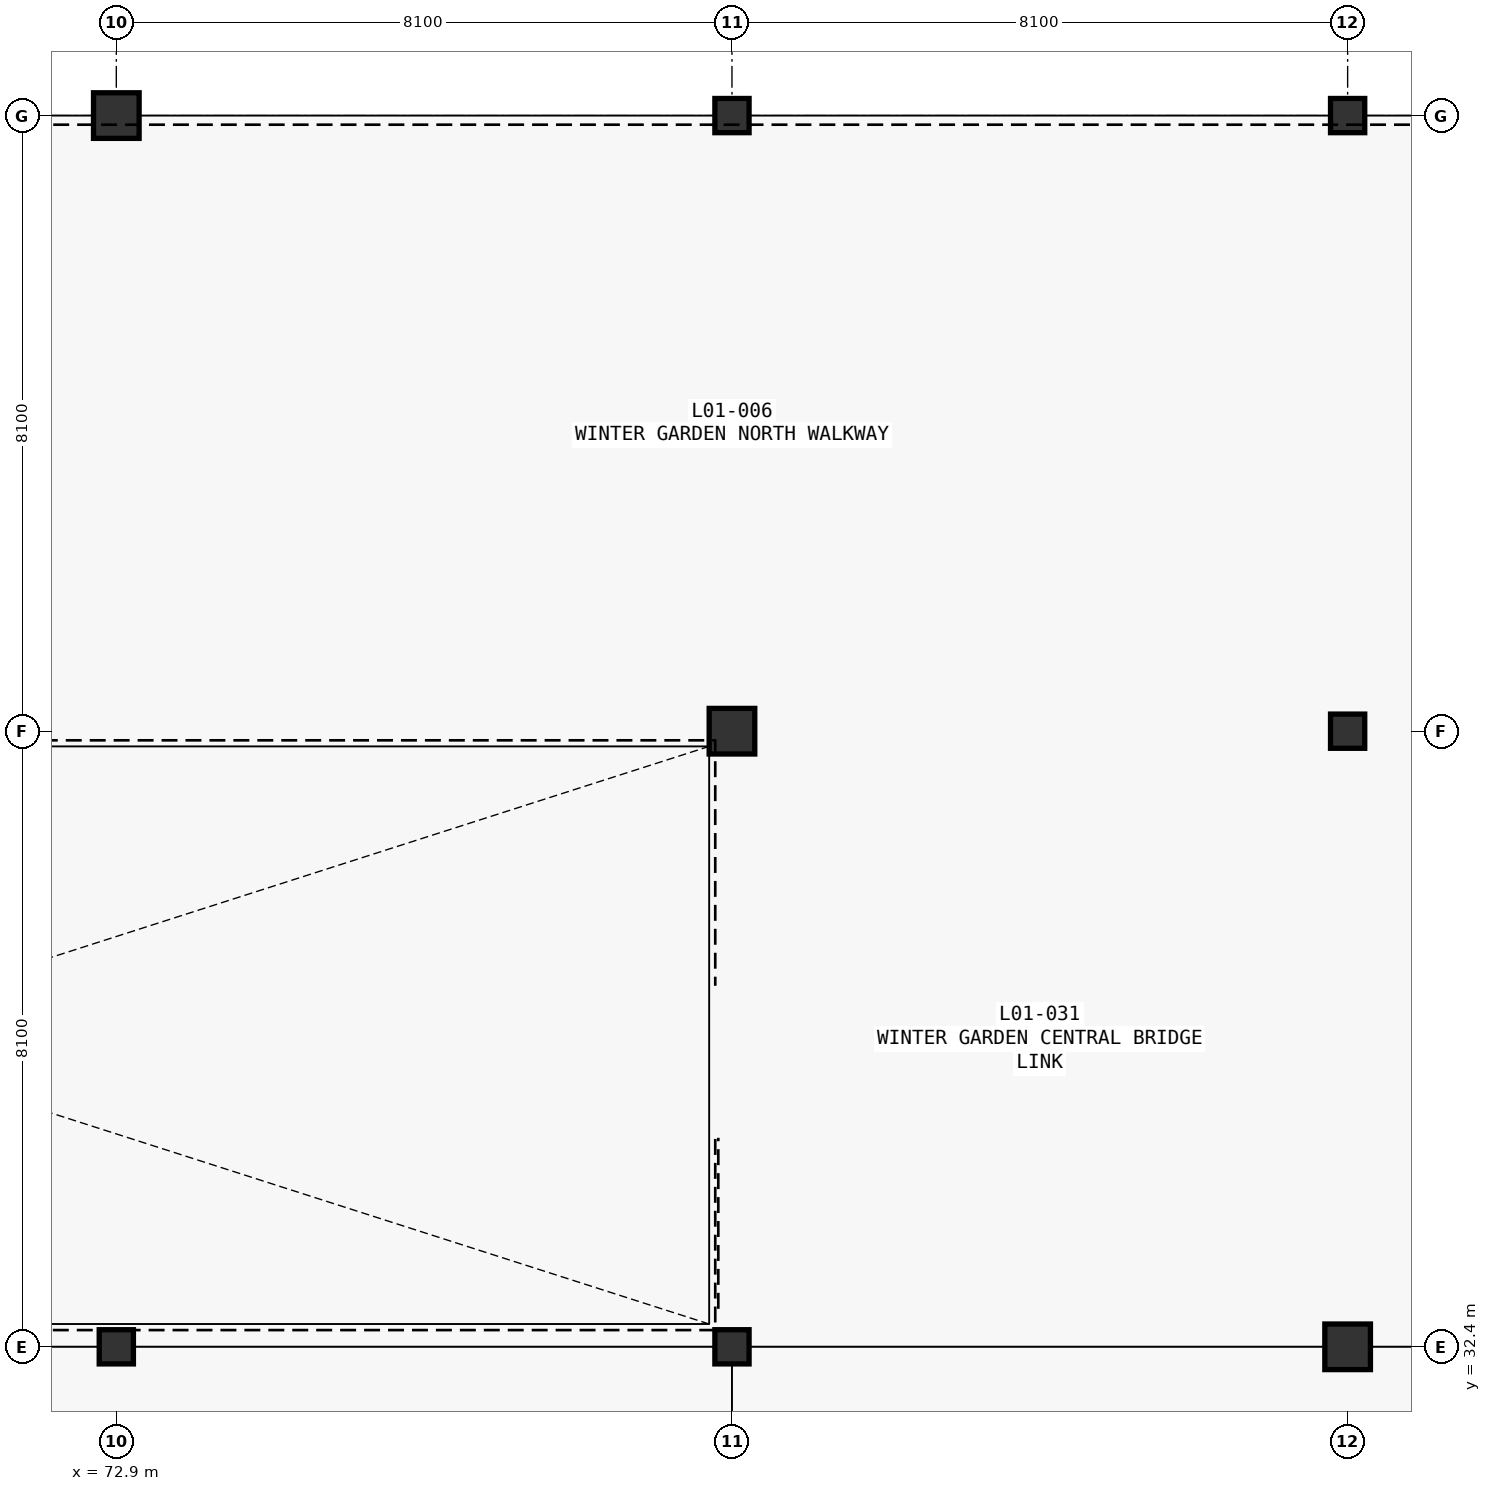
"""IFC4 building model, lengths in metres.
Left out: names, types, materials, properties, quantities, classifications, styles, units other than length and angle.
Written with IfcOpenShell. Run it as: python <this file> out.ifc"""

import sys

from ifc_helpers import new_model, si_unit, direction, frame, origin, origin_2d, place, context, subcontext, project, spatial, rectangle, circle, extrude, element, save


model = new_model("IFC4")
c1 = context("Model", 3, precision=1e-05, world=origin(), true_north=direction((0.0, 1.0)))
c2 = subcontext(c1, "Body", "Model", "MODEL_VIEW")
j1 = project(units=[si_unit("LENGTHUNIT", "METRE"), si_unit("PLANEANGLEUNIT", "RADIAN")], contexts=[c1])
p1 = place(None, origin())
s1 = spatial("IfcSite", under=j1, at=p1, CompositionType="ELEMENT")
p2 = place(p1, origin())
s2 = spatial("IfcBuilding", under=s1, at=p2, CompositionType="ELEMENT")
p3 = place(p2, frame((0.0, 0.0, 5.1)))
s3 = spatial("IfcBuildingStorey", under=s2, at=p3, CompositionType="ELEMENT", Elevation=5.1)
p4 = place(p3, frame((72.9, 32.4, 0.0), z_axis=(0.0, 0.0, 1.0), x_axis=(1.0, 0.0, 0.0)))
e1 = element("IfcColumn", 1, at=p4, inside=s3, PredefinedType="COLUMN", context=c2, shape_type="SweptSolid", body=[
    extrude(rectangle(XDim=0.45, YDim=0.45, at=origin_2d()), origin(), (0.0, 0.0, 1.0), 4.59),
])
p5 = place(p3, frame((72.9, 48.6, 0.0), z_axis=(0.0, 0.0, 1.0), x_axis=(1.0, 0.0, 0.0)))
e2 = element("IfcColumn", 2, at=p5, inside=s3, PredefinedType="COLUMN", context=c2, shape_type="SweptSolid", body=[
    extrude(circle(Radius=0.3, at=origin_2d()), origin(), (0.0, 0.0, 1.0), 4.59),
])
p6 = place(p3, frame((81.0, 32.4, 0.0), z_axis=(0.0, 0.0, 1.0), x_axis=(1.0, 0.0, 0.0)))
e3 = element("IfcColumn", 3, at=p6, inside=s3, PredefinedType="COLUMN", context=c2, shape_type="SweptSolid", body=[
    extrude(rectangle(XDim=0.45, YDim=0.45, at=origin_2d()), origin(), (0.0, 0.0, 1.0), 4.59),
])
p7 = place(p3, frame((81.0, 40.5, 0.0), z_axis=(0.0, 0.0, 1.0), x_axis=(1.0, 0.0, 0.0)))
e4 = element("IfcColumn", 4, at=p7, inside=s3, PredefinedType="COLUMN", context=c2, shape_type="SweptSolid", body=[
    extrude(circle(Radius=0.3, at=origin_2d()), origin(), (0.0, 0.0, 1.0), 4.59),
])
p8 = place(p3, frame((81.0, 48.6, 0.0), z_axis=(0.0, 0.0, 1.0), x_axis=(1.0, 0.0, 0.0)))
e5 = element("IfcColumn", 5, at=p8, inside=s3, PredefinedType="COLUMN", context=c2, shape_type="SweptSolid", body=[
    extrude(rectangle(XDim=0.45, YDim=0.45, at=origin_2d()), origin(), (0.0, 0.0, 1.0), 4.59),
])
p9 = place(p3, frame((89.1, 32.4, 0.0), z_axis=(0.0, 0.0, 1.0), x_axis=(1.0, 0.0, 0.0)))
e6 = element("IfcColumn", 6, at=p9, inside=s3, PredefinedType="COLUMN", context=c2, shape_type="SweptSolid", body=[
    extrude(circle(Radius=0.3, at=origin_2d()), origin(), (0.0, 0.0, 1.0), 4.59),
])
for number, where, z_axis, x_axis in (
    (7, (89.1, 40.5, 0.0), (0.0, 0.0, 1.0), (1.0, 0.0, 0.0)),
    (8, (89.1, 48.6, 0.0), (0.0, 0.0, 1.0), (1.0, 0.0, 0.0)),
):
    element("IfcColumn", number, at=place(p3, frame(where, z_axis=z_axis, x_axis=x_axis)), inside=s3, PredefinedType="COLUMN", context=c2, shape_type="SweptSolid", body=[
        extrude(rectangle(XDim=0.45, YDim=0.45, at=origin_2d()), origin(), (0.0, 0.0, 1.0), 4.59),
    ])
save(model, sys.argv[1])
